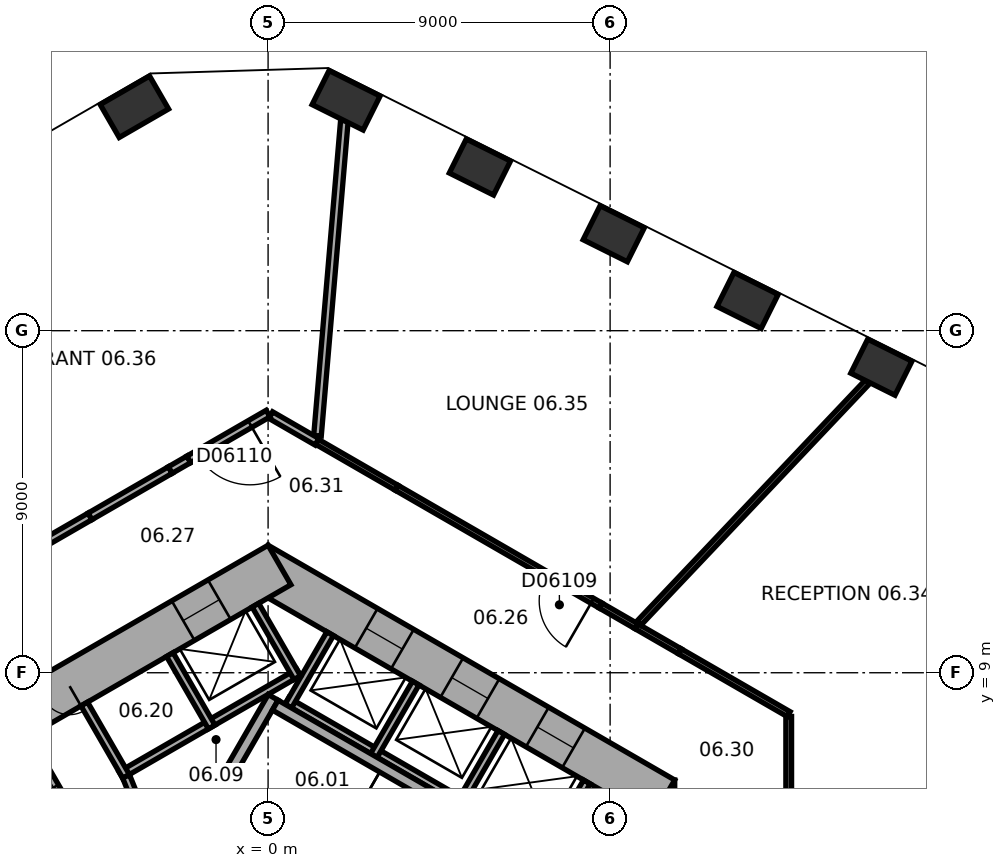
"""IFC4 building model, lengths in metres.
Left out: names, types, materials, properties, quantities, classifications, styles, units other than length and angle.
Written with IfcOpenShell. Run it as: python <this file> out.ifc"""

import sys

from ifc_helpers import new_model, si_unit, direction, frame, frame_2d, origin, origin_2d, place, context, subcontext, project, spatial, rectangle, extrude, element, fill, save


model = new_model("IFC4")
c1 = context("Model", 3, precision=1e-05, world=origin(), true_north=direction((0.0, 1.0)))
c2 = subcontext(c1, "Body", "Model", "MODEL_VIEW")
j1 = project(units=[si_unit("LENGTHUNIT", "METRE"), si_unit("PLANEANGLEUNIT", "RADIAN")], contexts=[c1])
p1 = place(None, origin())
s1 = spatial("IfcSite", under=j1, at=p1, CompositionType="ELEMENT")
p2 = place(p1, origin())
s2 = spatial("IfcBuilding", under=s1, at=p2, CompositionType="ELEMENT")
p3 = place(p2, frame((0.0, 0.0, 39.0)))
s3 = spatial("IfcBuildingStorey", under=s2, at=p3, CompositionType="ELEMENT", Elevation=39.0)
for number, where, z_axis, x_axis in (
    (1, (16.138, 17.04, 0.0), (0.0, 0.0, 1.0), (-0.895, 0.446, 0.0)),
    (2, (12.616, 18.795, 0.0), (0.0, 0.0, 1.0), (-0.895, 0.446, 0.0)),
    (3, (9.095, 20.551, 0.0), (0.0, 0.0, 1.0), (-0.895, 0.446, 0.0)),
    (4, (5.574, 22.306, 0.0), (0.0, 0.0, 1.0), (-0.895, 0.446, 0.0)),
):
    element("IfcColumn", number, at=place(p3, frame(where, z_axis=z_axis, x_axis=x_axis)), inside=s3, PredefinedType="COLUMN", context=c2, shape_type="SweptSolid", body=[
        extrude(rectangle(XDim=1.3, YDim=1.0, at=origin_2d()), origin(), (0.0, 0.0, 1.0), 5.0),
    ])
for number, where, z_axis, x_axis in (
    (5, (2.053, 24.062, 0.0), (0.0, 0.0, 1.0), (-0.895, 0.446, 0.0)),
    (6, (-3.518, 23.892, 0.0), (0.0, 0.0, 1.0), (-0.866, -0.5, 0.0)),
):
    element("IfcColumn", number, at=place(p3, frame(where, z_axis=z_axis, x_axis=x_axis)), inside=s3, PredefinedType="COLUMN", context=c2, shape_type="SweptSolid", body=[
        extrude(rectangle(XDim=1.5, YDim=1.0, at=origin_2d()), origin(), (0.0, 0.0, 1.0), 5.0),
    ])
p4 = place(p3, frame((10.1, -6.177, 0.0), z_axis=(0.0, 0.0, 1.0), x_axis=(0.0, 1.0, 0.0)))
e7 = element("IfcWall", 7, at=p4, inside=s3, PredefinedType="SHEAR", context=c2, shape_type="SweptSolid", body=[
    extrude(rectangle(XDim=12.355, YDim=1.2, at=frame_2d((6.177, 0.0))), origin(), (0.0, 0.0, 1.0), 5.0),
])
p5 = place(p4, frame((6.378, 0.0, 0.0)))
e8 = element("IfcOpeningElement", 8, at=p5, cuts=e7, PredefinedType="OPENING", context=c2, shape_type="SweptSolid", body=[
    extrude(rectangle(XDim=1.5, YDim=2.1, at=frame_2d((0.75, 1.05))), frame((0.0, 0.61, 0.0), z_axis=(0.0, -1.0, 0.0), x_axis=(1.0, 0.0, 0.0)), (0.0, 0.0, 1.0), 1.22),
])
p6 = place(p4, frame((1.828, 0.0, 0.0)))
e9 = element("IfcOpeningElement", 9, at=p6, cuts=e7, PredefinedType="OPENING", context=c2, shape_type="SweptSolid", body=[
    extrude(rectangle(XDim=1.1, YDim=2.1, at=frame_2d((0.55, 1.05))), frame((0.0, 0.61, 0.0), z_axis=(0.0, -1.0, 0.0), x_axis=(1.0, 0.0, 0.0)), (0.0, 0.0, 1.0), 1.22),
])
p7 = place(p4, frame((4.427, 0.0, 0.0)))
e10 = element("IfcOpeningElement", 10, at=p7, cuts=e7, PredefinedType="OPENING", context=c2, shape_type="SweptSolid", body=[
    extrude(rectangle(XDim=1.1, YDim=2.1, at=frame_2d((0.55, 1.05))), frame((0.0, 0.61, 0.0), z_axis=(0.0, -1.0, 0.0), x_axis=(1.0, 0.0, 0.0)), (0.0, 0.0, 1.0), 1.22),
])
p8 = place(p3, frame((10.4, 5.658, 0.0), z_axis=(0.0, 0.0, 1.0), x_axis=(-0.866021384402, 0.500006961711, 0.0)))
e11 = element("IfcWall", 11, at=p8, inside=s3, PredefinedType="SHEAR", context=c2, shape_type="SweptSolid", body=[
    extrude(rectangle(XDim=12.355, YDim=1.2, at=frame_2d((6.178, 0.0))), origin(), (0.0, 0.0, 1.0), 5.0),
])
p9 = place(p8, frame((2.728, 0.0, 0.0)))
e12 = element("IfcOpeningElement", 12, at=p9, cuts=e11, PredefinedType="OPENING", context=c2, shape_type="SweptSolid", body=[
    extrude(rectangle(XDim=1.1, YDim=2.1, at=frame_2d((0.55, 1.05))), frame((0.0, 0.61, 0.0), z_axis=(0.0, -1.0, 0.0), x_axis=(1.0, 0.0, 0.0)), (0.0, 0.0, 1.0), 1.22),
])
p10 = place(p8, frame((5.328, 0.0, 0.0)))
e13 = element("IfcOpeningElement", 13, at=p10, cuts=e11, PredefinedType="OPENING", context=c2, shape_type="SweptSolid", body=[
    extrude(rectangle(XDim=1.1, YDim=2.1, at=frame_2d((0.55, 1.05))), frame((0.0, 0.61, 0.0), z_axis=(0.0, -1.0, 0.0), x_axis=(1.0, 0.0, 0.0)), (0.0, 0.0, 1.0), 1.22),
])
p11 = place(p8, frame((7.928, 0.0, 0.0)))
e14 = element("IfcOpeningElement", 14, at=p11, cuts=e11, PredefinedType="OPENING", context=c2, shape_type="SweptSolid", body=[
    extrude(rectangle(XDim=1.1, YDim=2.1, at=frame_2d((0.55, 1.05))), frame((0.0, 0.61, 0.0), z_axis=(0.0, -1.0, 0.0), x_axis=(1.0, 0.0, 0.0)), (0.0, 0.0, 1.0), 1.22),
])
p12 = place(p3, frame((0.3, 11.836, 0.0), z_axis=(0.0, 0.0, 1.0), x_axis=(-0.866021384402, -0.500006961711, 0.0)))
e15 = element("IfcWall", 15, at=p12, inside=s3, PredefinedType="SHEAR", context=c2, shape_type="SweptSolid", body=[
    extrude(rectangle(XDim=12.355, YDim=1.2, at=frame_2d((6.178, 0.0))), origin(), (0.0, 0.0, 1.0), 5.0),
])
p13 = place(p12, frame((6.378, 0.0, 0.0)))
e16 = element("IfcOpeningElement", 16, at=p13, cuts=e15, PredefinedType="OPENING", context=c2, shape_type="SweptSolid", body=[
    extrude(rectangle(XDim=1.5, YDim=2.1, at=frame_2d((0.75, 1.05))), frame((0.0, 0.61, 0.0), z_axis=(0.0, -1.0, 0.0), x_axis=(1.0, 0.0, 0.0)), (0.0, 0.0, 1.0), 1.22),
])
p14 = place(p12, frame((1.828, 0.0, 0.0)))
e17 = element("IfcOpeningElement", 17, at=p14, cuts=e15, PredefinedType="OPENING", context=c2, shape_type="SweptSolid", body=[
    extrude(rectangle(XDim=1.1, YDim=2.1, at=frame_2d((0.55, 1.05))), frame((0.0, 0.61, 0.0), z_axis=(0.0, -1.0, 0.0), x_axis=(1.0, 0.0, 0.0)), (0.0, 0.0, 1.0), 1.22),
])
p15 = place(p3, frame((7.424, 4.259, 0.0), z_axis=(0.0, 0.0, 1.0), x_axis=(-0.866026010844, 0.49999894854, 0.0)))
e18 = element("IfcWall", 18, at=p15, inside=s3, PredefinedType="PARTITIONING", context=c2, shape_type="SweptSolid", body=[
    extrude(rectangle(XDim=8.0, YDim=0.2, at=frame_2d((4.0, 0.0))), origin(), (0.0, 0.0, 1.0), 4.75),
])
for number, where, z_axis, x_axis in (
    (19, (7.287, 4.222, 0.0), (0.0, 0.0, 1.0), (0.5, 0.866, 0.0)),
    (20, (5.036, 5.522, 0.0), (0.0, 0.0, 1.0), (0.5, 0.866, 0.0)),
    (21, (2.784, 6.822, 0.0), (0.0, 0.0, 1.0), (0.5, 0.866, 0.0)),
    (22, (0.532, 8.122, 0.0), (0.0, 0.0, 1.0), (0.5, 0.866, 0.0)),
):
    element("IfcWall", number, at=place(p3, frame(where, z_axis=z_axis, x_axis=x_axis)), inside=s3, PredefinedType="PARTITIONING", context=c2, shape_type="SweptSolid", body=[
        extrude(rectangle(XDim=2.2, YDim=0.2, at=frame_2d((1.1, 0.0))), origin(), (0.0, 0.0, 1.0), 4.75),
    ])
p16 = place(p3, frame((0.803, 9.009, 0.0), z_axis=(0.0, 0.0, 1.0), x_axis=(-0.866028230842, -0.499995103361, 0.0)))
e23 = element("IfcWall", 23, at=p16, inside=s3, PredefinedType="PARTITIONING", context=c2, shape_type="SweptSolid", body=[
    extrude(rectangle(XDim=5.4, YDim=0.2, at=frame_2d((2.7, 0.0))), origin(), (0.0, 0.0, 1.0), 4.75),
])
p17 = place(p3, frame((0.767, 8.872, 0.0), z_axis=(0.0, 0.0, 1.0), x_axis=(-0.499994660107, 0.866028486751, 0.0)))
e24 = element("IfcWall", 24, at=p17, inside=s3, PredefinedType="PARTITIONING", context=c2, shape_type="SweptSolid", body=[
    extrude(rectangle(XDim=2.2, YDim=0.2, at=frame_2d((1.1, 0.0))), origin(), (0.0, 0.0, 1.0), 4.75),
])
for number, where, z_axis, x_axis in (
    (25, (-1.485, 7.572, 0.0), (0.0, 0.0, 1.0), (-0.5, 0.866, 0.0)),
    (26, (-3.737, 6.272, 0.0), (0.0, 0.0, 1.0), (-0.5, 0.866, 0.0)),
):
    element("IfcWall", number, at=place(p3, frame(where, z_axis=z_axis, x_axis=x_axis)), inside=s3, PredefinedType="PARTITIONING", context=c2, shape_type="SweptSolid", body=[
        extrude(rectangle(XDim=2.2, YDim=0.2, at=frame_2d((1.1, 0.0))), origin(), (0.0, 0.0, 1.0), 4.75),
    ])
p18 = place(p3, frame((-2.216, 4.282, 0.0), z_axis=(0.0, 0.0, 1.0), x_axis=(0.499977259774, 0.866038532462, 0.0)))
e27 = element("IfcWall", 27, at=p18, inside=s3, PredefinedType="SHEAR", context=c2, shape_type="SweptSolid", body=[
    extrude(rectangle(XDim=4.7, YDim=0.3, at=frame_2d((2.35, 0.0))), origin(), (0.0, 0.0, 1.0), 4.75),
])
p19 = place(p3, frame((6.303, 4.617, 0.0), z_axis=(0.0, 0.0, 1.0), x_axis=(-0.866027801685, 0.499995846692, 0.0)))
e28 = element("IfcWall", 28, at=p19, inside=s3, PredefinedType="SHEAR", context=c2, shape_type="SweptSolid", body=[
    extrude(rectangle(XDim=7.06, YDim=0.3, at=frame_2d((3.53, 0.0))), origin(), (0.0, 0.0, 1.0), 4.75),
])
p20 = place(p3, frame((-5.295, 5.372, 0.0), z_axis=(0.0, 0.0, 1.0), x_axis=(-0.500077893725, 0.86598042715, 0.0)))
e29 = element("IfcWall", 29, at=p20, inside=s3, PredefinedType="SHEAR", context=c2, shape_type="SweptSolid", body=[
    extrude(rectangle(XDim=2.2, YDim=0.3, at=frame_2d((1.1, 0.0))), origin(), (0.0, 0.0, 1.0), 4.75),
])
p21 = place(p20, frame((0.7, 0.0, 0.0)))
e30 = element("IfcOpeningElement", 30, at=p21, cuts=e29, PredefinedType="OPENING", context=c2, shape_type="SweptSolid", body=[
    extrude(rectangle(XDim=1.1, YDim=2.1, at=frame_2d((0.55, 1.05))), frame((0.0, 0.16, 0.0), z_axis=(0.0, -1.0, 0.0), x_axis=(1.0, 0.0, 0.0)), (0.0, 0.0, 1.0), 0.32),
])
p22 = place(p3, frame((-2.615, 3.487, 0.0), z_axis=(0.0, 0.0, 1.0), x_axis=(-0.373576831041, 0.92759924068, 0.0)))
e31 = element("IfcWall", 31, at=p22, inside=s3, PredefinedType="PARTITIONING", context=c2, shape_type="SweptSolid", body=[
    extrude(rectangle(XDim=3.002, YDim=0.2, at=frame_2d((1.501, 0.0))), origin(), (0.0, 0.0, 1.0), 4.75),
])
p23 = place(p22, frame((1.15, 0.0, 0.0)))
e32 = element("IfcOpeningElement", 32, at=p23, cuts=e31, PredefinedType="OPENING", context=c2, shape_type="SweptSolid", body=[
    extrude(rectangle(XDim=0.9, YDim=2.1, at=frame_2d((0.45, 1.05))), frame((0.0, 0.11, 0.0), z_axis=(0.0, -1.0, 0.0), x_axis=(1.0, 0.0, 0.0)), (0.0, 0.0, 1.0), 0.22),
])
p24 = place(p3, frame((14.593, 4.446, 0.0), z_axis=(0.0, 0.0, 1.0), x_axis=(0.956592729621, 0.291428120874, 0.0)))
e33 = element("IfcWall", 33, at=p24, inside=s3, PredefinedType="PARTITIONING", context=c2, shape_type="SweptSolid", body=[
    extrude(rectangle(XDim=7.691, YDim=0.15, at=frame_2d((3.846, 0.0))), origin(), (0.0, 0.0, 1.0), 4.3),
])
p25 = place(p24, frame((5.991, 0.0, 0.0)))
e34 = element("IfcOpeningElement", 34, at=p25, cuts=e33, PredefinedType="OPENING", context=c2, shape_type="SweptSolid", body=[
    extrude(rectangle(XDim=1.4, YDim=2.4, at=frame_2d((0.7, 1.2))), frame((0.0, 0.085, 0.0), z_axis=(0.0, -1.0, 0.0), x_axis=(1.0, 0.0, 0.0)), (0.0, 0.0, 1.0), 0.17),
])
p26 = place(p3, frame((13.7, 7.85, 0.0), z_axis=(0.0, 0.0, 1.0), x_axis=(0.0, -1.0, 0.0)))
e35 = element("IfcWall", 35, at=p26, inside=s3, PredefinedType="PARTITIONING", context=c2, shape_type="SweptSolid", body=[
    extrude(rectangle(XDim=3.576, YDim=0.15, at=frame_2d((1.788, 0.0))), origin(), (0.0, 0.0, 1.0), 4.75),
])
p27 = place(p3, frame((13.7, 7.909, 0.0), z_axis=(0.0, 0.0, 1.0), x_axis=(-0.866014848099, 0.500018282537, 0.0)))
e36 = element("IfcWall", 36, at=p27, inside=s3, PredefinedType="PARTITIONING", context=c2, shape_type="SweptSolid", body=[
    extrude(rectangle(XDim=3.31, YDim=0.15, at=frame_2d((1.655, 0.0))), origin(), (0.0, 0.0, 1.0), 4.75),
])
p28 = place(p3, frame((10.833, 9.564, 0.0), z_axis=(0.0, 0.0, 1.0), x_axis=(-0.865989200783, 0.500062700197, 0.0)))
e37 = element("IfcWall", 37, at=p28, inside=s3, PredefinedType="PARTITIONING", context=c2, shape_type="SweptSolid", body=[
    extrude(rectangle(XDim=1.325, YDim=0.15, at=frame_2d((0.663, 0.0))), origin(), (0.0, 0.0, 1.0), 4.75),
])
p29 = place(p3, frame((-10.465, 9.778, 0.0), z_axis=(0.0, 0.0, 1.0), x_axis=(0.866019272134, 0.50001062018, 0.0)))
e38 = element("IfcWall", 38, at=p29, inside=s3, PredefinedType="PARTITIONING", context=c2, shape_type="SweptSolid", body=[
    extrude(rectangle(XDim=6.674, YDim=0.2, at=frame_2d((3.337, 0.0))), origin(), (0.0, 0.0, 1.0), 4.75),
])
p30 = place(p3, frame((9.686, 10.227, 0.0), z_axis=(0.0, 0.0, 1.0), x_axis=(-0.866065156741, 0.499931139538, 0.0)))
e39 = element("IfcWall", 39, at=p30, inside=s3, PredefinedType="PARTITIONING", context=c2, shape_type="SweptSolid", body=[
    extrude(rectangle(XDim=1.08, YDim=0.15, at=frame_2d((0.54, 0.0))), origin(), (0.0, 0.0, 1.0), 4.75),
])
p31 = place(p3, frame((9.755, 10.3, 0.0), z_axis=(0.0, 0.0, 1.0), x_axis=(0.687615543878, 0.72607497121, 0.0)))
e40 = element("IfcWall", 40, at=p31, inside=s3, PredefinedType="PARTITIONING", context=c2, shape_type="SweptSolid", body=[
    extrude(rectangle(XDim=8.76, YDim=0.15, at=frame_2d((4.38, 0.0))), origin(), (0.0, 0.0, 1.0), 4.75),
])
p32 = place(p3, frame((8.75, 10.767, 0.0), z_axis=(0.0, 0.0, 1.0), x_axis=(-0.866010341957, 0.500026086943, 0.0)))
e41 = element("IfcWall", 41, at=p32, inside=s3, PredefinedType="PARTITIONING", context=c2, shape_type="SweptSolid", body=[
    extrude(rectangle(XDim=6.195, YDim=0.15, at=frame_2d((3.097, 0.0))), origin(), (0.0, 0.0, 1.0), 4.75),
])
p33 = place(p32, frame((0.25, 0.0, 0.0)))
e42 = element("IfcOpeningElement", 42, at=p33, cuts=e41, PredefinedType="OPENING", context=c2, shape_type="SweptSolid", body=[
    extrude(rectangle(XDim=1.4, YDim=2.4, at=frame_2d((0.7, 1.2))), frame((0.0, 0.085, 0.0), z_axis=(0.0, -1.0, 0.0), x_axis=(1.0, 0.0, 0.0)), (0.0, 0.0, 1.0), 0.17),
])
p34 = place(p3, frame((-4.685, 13.115, 0.0), z_axis=(0.0, 0.0, 1.0), x_axis=(0.86602886455, 0.49999400573, 0.0)))
e43 = element("IfcWall", 43, at=p34, inside=s3, PredefinedType="PARTITIONING", context=c2, shape_type="SweptSolid", body=[
    extrude(rectangle(XDim=2.438, YDim=0.2, at=frame_2d((1.219, 0.0))), origin(), (0.0, 0.0, 1.0), 4.75),
])
p35 = place(p3, frame((-2.573, 14.334, 0.0), z_axis=(0.0, 0.0, 1.0), x_axis=(0.866040790738, 0.499973348067, 0.0)))
e44 = element("IfcWall", 44, at=p35, inside=s3, PredefinedType="PARTITIONING", context=c2, shape_type="SweptSolid", body=[
    extrude(rectangle(XDim=0.562, YDim=0.2, at=frame_2d((0.281, 0.0))), origin(), (0.0, 0.0, 1.0), 4.75),
])
p36 = place(p3, frame((1.287, 15.077, 0.0), z_axis=(0.0, 0.0, 1.0), x_axis=(0.865965872932, -0.500103096288, 0.0)))
e45 = element("IfcWall", 45, at=p36, inside=s3, PredefinedType="PARTITIONING", context=c2, shape_type="SweptSolid", body=[
    extrude(rectangle(XDim=2.424, YDim=0.15, at=frame_2d((1.212, 0.0))), origin(), (0.0, 0.0, 1.0), 4.75),
])
p37 = place(p3, frame((1.3, 15.236, 0.0), z_axis=(0.0, 0.0, 1.0), x_axis=(0.085009958898, 0.996380101612, 0.0)))
e46 = element("IfcWall", 46, at=p37, inside=s3, PredefinedType="PARTITIONING", context=c2, shape_type="SweptSolid", body=[
    extrude(rectangle(XDim=8.32, YDim=0.2, at=frame_2d((4.16, 0.0))), origin(), (0.0, 0.0, 1.0), 4.75),
])
p38 = place(p3, frame((0.069, 15.78, 0.0), z_axis=(0.0, 0.0, 1.0), x_axis=(0.866075676255, -0.499912915416, 0.0)))
e47 = element("IfcWall", 47, at=p38, inside=s3, PredefinedType="PARTITIONING", context=c2, shape_type="SweptSolid", body=[
    extrude(rectangle(XDim=1.406, YDim=0.2, at=frame_2d((0.703, 0.0))), origin(), (0.0, 0.0, 1.0), 4.75),
])
p39 = place(p3, frame((0.0, 15.82, 0.0), z_axis=(0.0, 0.0, 1.0), x_axis=(-0.86598987286, -0.500061536317, 0.0)))
e48 = element("IfcWall", 48, at=p39, inside=s3, PredefinedType="PARTITIONING", context=c2, shape_type="SweptSolid", body=[
    extrude(rectangle(XDim=2.41, YDim=0.2, at=frame_2d((1.205, 0.0))), origin(), (0.0, 0.0, 1.0), 4.75),
])
p40 = place(p39, frame((0.55, 0.0, 0.0)))
e49 = element("IfcOpeningElement", 49, at=p40, cuts=e48, PredefinedType="OPENING", context=c2, shape_type="SweptSolid", body=[
    extrude(rectangle(XDim=1.6, YDim=2.4, at=frame_2d((0.8, 1.2))), frame((0.0, 0.11, 0.0), z_axis=(0.0, -1.0, 0.0), x_axis=(1.0, 0.0, 0.0)), (0.0, 0.0, 1.0), 0.22),
])
p41 = place(p13, origin())
e50 = element("IfcDoor", 50, at=p41, inside=s3, OperationType="DOUBLE_DOOR_SINGLE_SWING", PredefinedType="DOOR", context=c2, shape_type="SweptSolid", body=[
    extrude(rectangle(XDim=1.5, YDim=2.1, at=frame_2d((0.75, 1.05))), frame((0.0, 0.025, 0.0), z_axis=(0.0, -1.0, 0.0), x_axis=(1.0, 0.0, 0.0)), (0.0, 0.0, 1.0), 0.05),
])
fill(e16, e50)
p42 = place(p21, origin())
e51 = element("IfcDoor", 51, at=p42, inside=s3, OperationType="DOUBLE_DOOR_SLIDING", PredefinedType="DOOR", context=c2, shape_type="SweptSolid", body=[
    extrude(rectangle(XDim=1.1, YDim=2.1, at=frame_2d((0.55, 1.05))), frame((0.0, 0.025, 0.0), z_axis=(0.0, -1.0, 0.0), x_axis=(1.0, 0.0, 0.0)), (0.0, 0.0, 1.0), 0.05),
])
fill(e30, e51)
p43 = place(p9, origin())
e52 = element("IfcDoor", 52, at=p43, inside=s3, OperationType="DOUBLE_DOOR_SLIDING", PredefinedType="DOOR", context=c2, shape_type="SweptSolid", body=[
    extrude(rectangle(XDim=1.1, YDim=2.1, at=frame_2d((0.55, 1.05))), frame((0.0, 0.025, 0.0), z_axis=(0.0, -1.0, 0.0), x_axis=(1.0, 0.0, 0.0)), (0.0, 0.0, 1.0), 0.05),
])
fill(e12, e52)
p44 = place(p10, origin())
e53 = element("IfcDoor", 53, at=p44, inside=s3, OperationType="DOUBLE_DOOR_SLIDING", PredefinedType="DOOR", context=c2, shape_type="SweptSolid", body=[
    extrude(rectangle(XDim=1.1, YDim=2.1, at=frame_2d((0.55, 1.05))), frame((0.0, 0.025, 0.0), z_axis=(0.0, -1.0, 0.0), x_axis=(1.0, 0.0, 0.0)), (0.0, 0.0, 1.0), 0.05),
])
fill(e13, e53)
p45 = place(p11, origin())
e54 = element("IfcDoor", 54, at=p45, inside=s3, OperationType="DOUBLE_DOOR_SLIDING", PredefinedType="DOOR", context=c2, shape_type="SweptSolid", body=[
    extrude(rectangle(XDim=1.1, YDim=2.1, at=frame_2d((0.55, 1.05))), frame((0.0, 0.025, 0.0), z_axis=(0.0, -1.0, 0.0), x_axis=(1.0, 0.0, 0.0)), (0.0, 0.0, 1.0), 0.05),
])
fill(e14, e54)
p46 = place(p14, origin())
e55 = element("IfcDoor", 55, at=p46, inside=s3, OperationType="DOUBLE_DOOR_SLIDING", PredefinedType="DOOR", context=c2, shape_type="SweptSolid", body=[
    extrude(rectangle(XDim=1.1, YDim=2.1, at=frame_2d((0.55, 1.05))), frame((0.0, 0.025, 0.0), z_axis=(0.0, -1.0, 0.0), x_axis=(1.0, 0.0, 0.0)), (0.0, 0.0, 1.0), 0.05),
])
fill(e17, e55)
p47 = place(p33, origin())
e56 = element("IfcDoor", 56, at=p47, inside=s3, OperationType="SINGLE_SWING_LEFT", PredefinedType="DOOR", context=c2, shape_type="SweptSolid", body=[
    extrude(rectangle(XDim=1.4, YDim=2.4, at=frame_2d((0.7, 1.2))), frame((0.0, 0.025, 0.0), z_axis=(0.0, -1.0, 0.0), x_axis=(1.0, 0.0, 0.0)), (0.0, 0.0, 1.0), 0.05),
])
fill(e42, e56)
p48 = place(p40, origin())
e57 = element("IfcDoor", 57, at=p48, inside=s3, OperationType="DOUBLE_DOOR_SINGLE_SWING", PredefinedType="DOOR", context=c2, shape_type="SweptSolid", body=[
    extrude(rectangle(XDim=1.6, YDim=2.4, at=frame_2d((0.8, 1.2))), frame((0.0, 0.025, 0.0), z_axis=(0.0, -1.0, 0.0), x_axis=(1.0, 0.0, 0.0)), (0.0, 0.0, 1.0), 0.05),
])
fill(e49, e57)
save(model, sys.argv[1])
